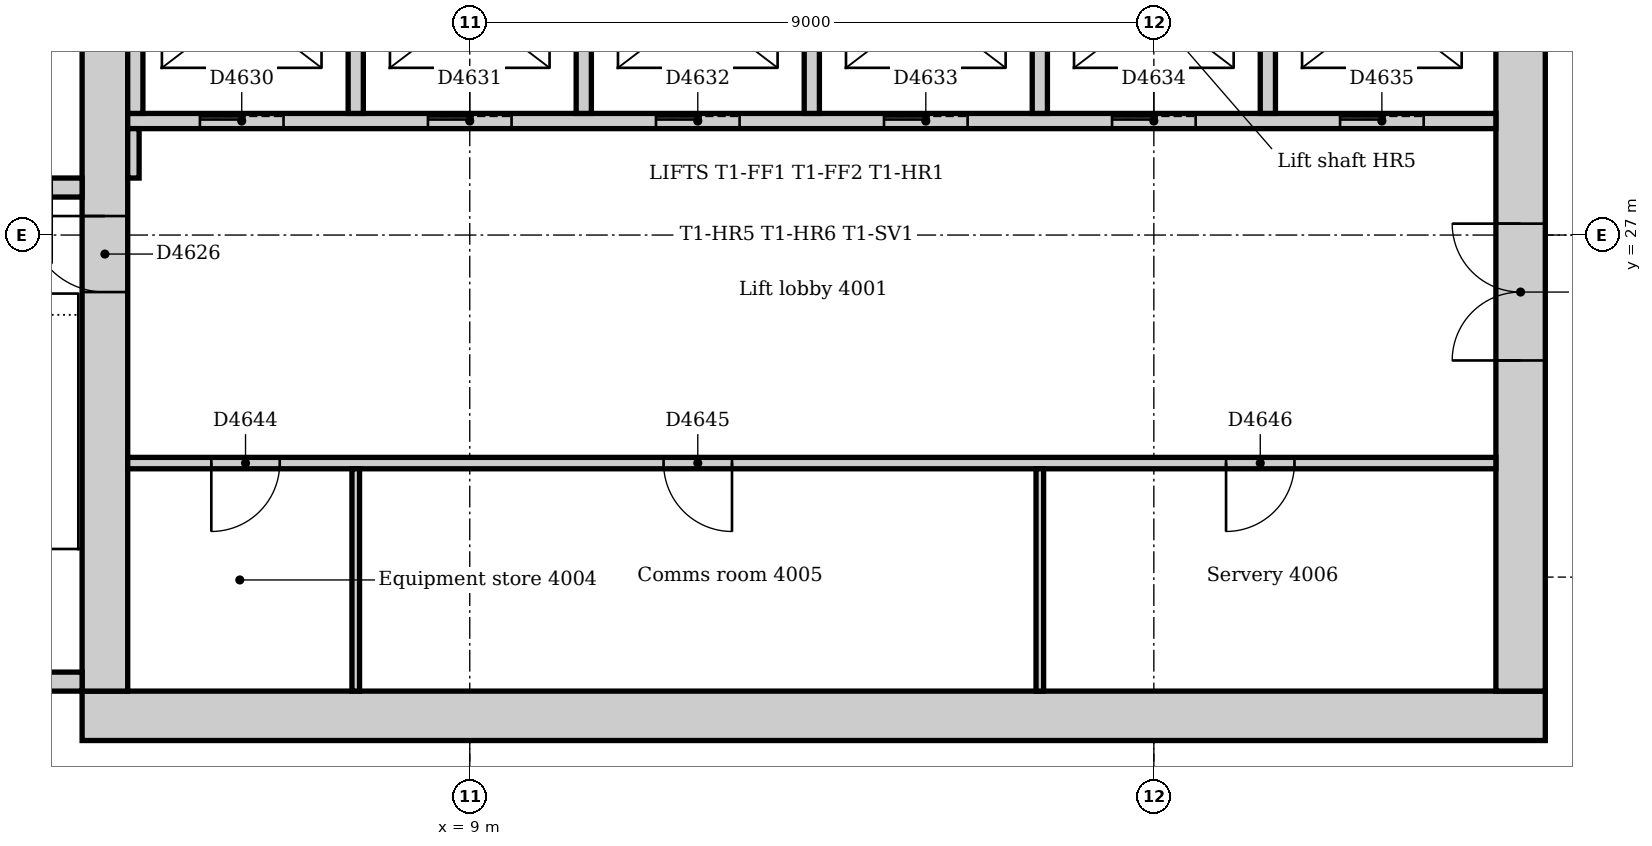
"""IFC4 building model, lengths in metres.
Left out: names, types, materials, properties, quantities, classifications, styles, units other than length and angle.
Written with IfcOpenShell. Run it as: python <this file> out.ifc"""

import sys

from ifc_helpers import new_model, si_unit, direction, frame, frame_2d, origin, place, context, subcontext, project, spatial, rectangle, extrude, element, fill, save


model = new_model("IFC4")
c1 = context("Model", 3, precision=1e-05, world=origin(), true_north=direction((0.0, 1.0)))
c2 = subcontext(c1, "Body", "Model", "MODEL_VIEW")
j1 = project(units=[si_unit("LENGTHUNIT", "METRE"), si_unit("PLANEANGLEUNIT", "RADIAN")], contexts=[c1])
p1 = place(None, origin())
s1 = spatial("IfcSite", under=j1, at=p1, CompositionType="ELEMENT")
p2 = place(p1, origin())
s2 = spatial("IfcBuilding", under=s1, at=p2, CompositionType="ELEMENT")
p3 = place(p2, frame((0.0, 0.0, 169.0)))
s3 = spatial("IfcBuildingStorey", under=s2, at=p3, CompositionType="ELEMENT", Elevation=169.0)
p4 = place(p3, frame((3.9, 20.675, 0.0), z_axis=(0.0, 0.0, 1.0), x_axis=(1.0, 0.0, 0.0)))
e1 = element("IfcWall", 1, at=p4, inside=s3, PredefinedType="SOLIDWALL", context=c2, shape_type="SweptSolid", body=[
    extrude(rectangle(XDim=19.25, YDim=0.65, at=frame_2d((9.625, 0.0))), origin(), (0.0, 0.0, 1.0), 4.0),
])
p5 = place(p3, frame((22.825, 21.0, 0.0), z_axis=(0.0, 0.0, 1.0), x_axis=(0.0, 1.0, 0.0)))
e2 = element("IfcWall", 2, at=p5, inside=s3, PredefinedType="SOLIDWALL", context=c2, shape_type="SweptSolid", body=[
    extrude(rectangle(XDim=10.5, YDim=0.65, at=frame_2d((5.25, 0.0))), origin(), (0.0, 0.0, 1.0), 4.0),
])
p6 = place(p5, frame((4.35, 0.0, 0.0)))
e3 = element("IfcOpeningElement", 3, at=p6, cuts=e2, PredefinedType="OPENING", context=c2, shape_type="SweptSolid", body=[
    extrude(rectangle(XDim=1.8, YDim=2.1, at=frame_2d((0.9, 1.05))), frame((0.0, 0.335, 0.0), z_axis=(0.0, -1.0, 0.0), x_axis=(1.0, 0.0, 0.0)), (0.0, 0.0, 1.0), 0.67),
])
p7 = place(p3, frame((4.2, 31.5, 0.0), z_axis=(0.0, 0.0, 1.0), x_axis=(0.0, -1.0, 0.0)))
e4 = element("IfcWall", 4, at=p7, inside=s3, PredefinedType="SOLIDWALL", context=c2, shape_type="SweptSolid", body=[
    extrude(rectangle(XDim=10.5, YDim=0.6, at=frame_2d((5.25, 0.0))), origin(), (0.0, 0.0, 1.0), 4.0),
])
p8 = place(p7, frame((4.25, 0.0, 0.0)))
e5 = element("IfcOpeningElement", 5, at=p8, cuts=e4, PredefinedType="OPENING", context=c2, shape_type="SweptSolid", body=[
    extrude(rectangle(XDim=1.0, YDim=2.1, at=frame_2d((0.5, 1.05))), frame((0.0, 0.31, 0.0), z_axis=(0.0, -1.0, 0.0), x_axis=(1.0, 0.0, 0.0)), (0.0, 0.0, 1.0), 0.62),
])
p9 = place(p3, frame((0.36, 21.125, 0.0), z_axis=(0.0, 0.0, 1.0), x_axis=(1.0, 0.0, 0.0)))
e6 = element("IfcWall", 6, at=p9, inside=s3, PredefinedType="SOLIDWALL", context=c2, shape_type="SweptSolid", body=[
    extrude(rectangle(XDim=3.54, YDim=0.25, at=frame_2d((1.77, 0.0))), origin(), (0.0, 0.0, 1.0), 4.0),
])
p10 = place(p3, frame((3.9, 27.625, 0.0), z_axis=(0.0, 0.0, 1.0), x_axis=(-1.0, 0.0, 0.0)))
e7 = element("IfcWall", 7, at=p10, inside=s3, PredefinedType="SOLIDWALL", context=c2, shape_type="SweptSolid", body=[
    extrude(rectangle(XDim=3.54, YDim=0.25, at=frame_2d((1.77, 0.0))), origin(), (0.0, 0.0, 1.0), 4.0),
])
p11 = place(p10, frame((0.4, 0.0, 0.0)))
e8 = element("IfcOpeningElement", 8, at=p11, cuts=e7, PredefinedType="OPENING", context=c2, shape_type="SweptSolid", body=[
    extrude(rectangle(XDim=1.0, YDim=2.1, at=frame_2d((0.5, 1.05))), frame((0.0, 0.135, 0.0), z_axis=(0.0, -1.0, 0.0), x_axis=(1.0, 0.0, 0.0)), (0.0, 0.0, 1.0), 0.27),
])
p12 = place(p3, frame((4.5, 28.5, 0.0), z_axis=(0.0, 0.0, 1.0), x_axis=(1.0, 0.0, 0.0)))
e9 = element("IfcWall", 9, at=p12, inside=s3, PredefinedType="PARTITIONING", context=c2, shape_type="SweptSolid", body=[
    extrude(rectangle(XDim=18.0, YDim=0.2, at=frame_2d((9.0, 0.0))), origin(), (0.0, 0.0, 1.0), 3.85),
])
p13 = place(p12, frame((0.95, 0.0, 0.0)))
e10 = element("IfcOpeningElement", 10, at=p13, cuts=e9, PredefinedType="OPENING", context=c2, shape_type="SweptSolid", body=[
    extrude(rectangle(XDim=1.1, YDim=2.1, at=frame_2d((0.55, 1.05))), frame((0.0, 0.11, 0.0), z_axis=(0.0, -1.0, 0.0), x_axis=(1.0, 0.0, 0.0)), (0.0, 0.0, 1.0), 0.22),
])
p14 = place(p12, frame((3.95, 0.0, 0.0)))
e11 = element("IfcOpeningElement", 11, at=p14, cuts=e9, PredefinedType="OPENING", context=c2, shape_type="SweptSolid", body=[
    extrude(rectangle(XDim=1.1, YDim=2.1, at=frame_2d((0.55, 1.05))), frame((0.0, 0.11, 0.0), z_axis=(0.0, -1.0, 0.0), x_axis=(1.0, 0.0, 0.0)), (0.0, 0.0, 1.0), 0.22),
])
p15 = place(p12, frame((6.95, 0.0, 0.0)))
e12 = element("IfcOpeningElement", 12, at=p15, cuts=e9, PredefinedType="OPENING", context=c2, shape_type="SweptSolid", body=[
    extrude(rectangle(XDim=1.1, YDim=2.1, at=frame_2d((0.55, 1.05))), frame((0.0, 0.11, 0.0), z_axis=(0.0, -1.0, 0.0), x_axis=(1.0, 0.0, 0.0)), (0.0, 0.0, 1.0), 0.22),
])
p16 = place(p12, frame((9.95, 0.0, 0.0)))
e13 = element("IfcOpeningElement", 13, at=p16, cuts=e9, PredefinedType="OPENING", context=c2, shape_type="SweptSolid", body=[
    extrude(rectangle(XDim=1.1, YDim=2.1, at=frame_2d((0.55, 1.05))), frame((0.0, 0.11, 0.0), z_axis=(0.0, -1.0, 0.0), x_axis=(1.0, 0.0, 0.0)), (0.0, 0.0, 1.0), 0.22),
])
p17 = place(p12, frame((12.95, 0.0, 0.0)))
e14 = element("IfcOpeningElement", 14, at=p17, cuts=e9, PredefinedType="OPENING", context=c2, shape_type="SweptSolid", body=[
    extrude(rectangle(XDim=1.1, YDim=2.1, at=frame_2d((0.55, 1.05))), frame((0.0, 0.11, 0.0), z_axis=(0.0, -1.0, 0.0), x_axis=(1.0, 0.0, 0.0)), (0.0, 0.0, 1.0), 0.22),
])
p18 = place(p12, frame((15.95, 0.0, 0.0)))
e15 = element("IfcOpeningElement", 15, at=p18, cuts=e9, PredefinedType="OPENING", context=c2, shape_type="SweptSolid", body=[
    extrude(rectangle(XDim=1.1, YDim=2.1, at=frame_2d((0.55, 1.05))), frame((0.0, 0.11, 0.0), z_axis=(0.0, -1.0, 0.0), x_axis=(1.0, 0.0, 0.0)), (0.0, 0.0, 1.0), 0.22),
])
for number, where, z_axis, x_axis in (
    (16, (10.5, 28.6, 0.0), (0.0, 0.0, 1.0), (0.0, 1.0, 0.0)),
    (17, (13.5, 28.6, 0.0), (0.0, 0.0, 1.0), (0.0, 1.0, 0.0)),
    (18, (16.5, 28.6, 0.0), (0.0, 0.0, 1.0), (0.0, 1.0, 0.0)),
    (19, (19.5, 28.6, 0.0), (0.0, 0.0, 1.0), (0.0, 1.0, 0.0)),
    (20, (4.6, 28.6, 0.0), (0.0, 0.0, 1.0), (0.0, 1.0, 0.0)),
    (21, (7.5, 28.6, 0.0), (0.0, 0.0, 1.0), (0.0, 1.0, 0.0)),
):
    element("IfcWall", number, at=place(p3, frame(where, z_axis=z_axis, x_axis=x_axis)), inside=s3, PredefinedType="PARTITIONING", context=c2, shape_type="SweptSolid", body=[
        extrude(rectangle(XDim=2.65, YDim=0.2, at=frame_2d((1.325, 0.0))), origin(), (0.0, 0.0, 1.0), 3.85),
    ])
p19 = place(p3, frame((4.5, 24.0, 0.0), z_axis=(0.0, 0.0, 1.0), x_axis=(1.0, 0.0, 0.0)))
e22 = element("IfcWall", 22, at=p19, inside=s3, PredefinedType="PARTITIONING", context=c2, shape_type="SweptSolid", body=[
    extrude(rectangle(XDim=18.0, YDim=0.15, at=frame_2d((9.0, 0.0))), origin(), (0.0, 0.0, 1.0), 3.85),
])
p20 = place(p19, frame((1.1, 0.0, 0.0)))
e23 = element("IfcOpeningElement", 23, at=p20, cuts=e22, PredefinedType="OPENING", context=c2, shape_type="SweptSolid", body=[
    extrude(rectangle(XDim=0.9, YDim=2.1, at=frame_2d((0.45, 1.05))), frame((0.0, 0.085, 0.0), z_axis=(0.0, -1.0, 0.0), x_axis=(1.0, 0.0, 0.0)), (0.0, 0.0, 1.0), 0.17),
])
p21 = place(p19, frame((7.05, 0.0, 0.0)))
e24 = element("IfcOpeningElement", 24, at=p21, cuts=e22, PredefinedType="OPENING", context=c2, shape_type="SweptSolid", body=[
    extrude(rectangle(XDim=0.9, YDim=2.1, at=frame_2d((0.45, 1.05))), frame((0.0, 0.085, 0.0), z_axis=(0.0, -1.0, 0.0), x_axis=(1.0, 0.0, 0.0)), (0.0, 0.0, 1.0), 0.17),
])
p22 = place(p19, frame((14.45, 0.0, 0.0)))
e25 = element("IfcOpeningElement", 25, at=p22, cuts=e22, PredefinedType="OPENING", context=c2, shape_type="SweptSolid", body=[
    extrude(rectangle(XDim=0.9, YDim=2.1, at=frame_2d((0.45, 1.05))), frame((0.0, 0.085, 0.0), z_axis=(0.0, -1.0, 0.0), x_axis=(1.0, 0.0, 0.0)), (0.0, 0.0, 1.0), 0.17),
])
p23 = place(p3, frame((4.575, 27.75, 0.0), z_axis=(0.0, 0.0, 1.0), x_axis=(0.0, 1.0, 0.0)))
e26 = element("IfcWall", 26, at=p23, inside=s3, PredefinedType="PARTITIONING", context=c2, shape_type="SweptSolid", body=[
    extrude(rectangle(XDim=0.65, YDim=0.15, at=frame_2d((0.325, 0.0))), origin(), (0.0, 0.0, 1.0), 3.85),
])
for number, where, z_axis, x_axis in (
    (27, (7.5, 21.0, 0.0), (0.0, 0.0, 1.0), (0.0, 1.0, 0.0)),
    (28, (16.5, 21.0, 0.0), (0.0, 0.0, 1.0), (0.0, 1.0, 0.0)),
):
    element("IfcWall", number, at=place(p3, frame(where, z_axis=z_axis, x_axis=x_axis)), inside=s3, PredefinedType="PARTITIONING", context=c2, shape_type="SweptSolid", body=[
        extrude(rectangle(XDim=2.925, YDim=0.1, at=frame_2d((1.462, 0.0))), origin(), (0.0, 0.0, 1.0), 3.85),
    ])
p24 = place(p8, frame((1.0, 0.0, 0.0), z_axis=(0.0, 0.0, 1.0), x_axis=(-1.0, 0.0, 0.0)))
e29 = element("IfcDoor", 29, at=p24, inside=s3, OperationType="SINGLE_SWING_RIGHT", PredefinedType="DOOR", context=c2, shape_type="SweptSolid", body=[
    extrude(rectangle(XDim=1.0, YDim=2.1, at=frame_2d((0.5, 1.05))), frame((0.0, 0.025, 0.0), z_axis=(0.0, -1.0, 0.0), x_axis=(1.0, 0.0, 0.0)), (0.0, 0.0, 1.0), 0.05),
])
fill(e5, e29)
p25 = place(p13, origin())
e30 = element("IfcDoor", 30, at=p25, inside=s3, OperationType="SLIDING_TO_LEFT", PredefinedType="DOOR", context=c2, shape_type="SweptSolid", body=[
    extrude(rectangle(XDim=1.1, YDim=2.1, at=frame_2d((0.55, 1.05))), frame((0.0, 0.025, 0.0), z_axis=(0.0, -1.0, 0.0), x_axis=(1.0, 0.0, 0.0)), (0.0, 0.0, 1.0), 0.05),
])
fill(e10, e30)
p26 = place(p14, origin())
e31 = element("IfcDoor", 31, at=p26, inside=s3, OperationType="SLIDING_TO_LEFT", PredefinedType="DOOR", context=c2, shape_type="SweptSolid", body=[
    extrude(rectangle(XDim=1.1, YDim=2.1, at=frame_2d((0.55, 1.05))), frame((0.0, 0.025, 0.0), z_axis=(0.0, -1.0, 0.0), x_axis=(1.0, 0.0, 0.0)), (0.0, 0.0, 1.0), 0.05),
])
fill(e11, e31)
p27 = place(p15, origin())
e32 = element("IfcDoor", 32, at=p27, inside=s3, OperationType="SLIDING_TO_LEFT", PredefinedType="DOOR", context=c2, shape_type="SweptSolid", body=[
    extrude(rectangle(XDim=1.1, YDim=2.1, at=frame_2d((0.55, 1.05))), frame((0.0, 0.025, 0.0), z_axis=(0.0, -1.0, 0.0), x_axis=(1.0, 0.0, 0.0)), (0.0, 0.0, 1.0), 0.05),
])
fill(e12, e32)
p28 = place(p16, origin())
e33 = element("IfcDoor", 33, at=p28, inside=s3, OperationType="SLIDING_TO_LEFT", PredefinedType="DOOR", context=c2, shape_type="SweptSolid", body=[
    extrude(rectangle(XDim=1.1, YDim=2.1, at=frame_2d((0.55, 1.05))), frame((0.0, 0.025, 0.0), z_axis=(0.0, -1.0, 0.0), x_axis=(1.0, 0.0, 0.0)), (0.0, 0.0, 1.0), 0.05),
])
fill(e13, e33)
p29 = place(p17, origin())
e34 = element("IfcDoor", 34, at=p29, inside=s3, OperationType="SLIDING_TO_LEFT", PredefinedType="DOOR", context=c2, shape_type="SweptSolid", body=[
    extrude(rectangle(XDim=1.1, YDim=2.1, at=frame_2d((0.55, 1.05))), frame((0.0, 0.025, 0.0), z_axis=(0.0, -1.0, 0.0), x_axis=(1.0, 0.0, 0.0)), (0.0, 0.0, 1.0), 0.05),
])
fill(e14, e34)
p30 = place(p18, origin())
e35 = element("IfcDoor", 35, at=p30, inside=s3, OperationType="SLIDING_TO_LEFT", PredefinedType="DOOR", context=c2, shape_type="SweptSolid", body=[
    extrude(rectangle(XDim=1.1, YDim=2.1, at=frame_2d((0.55, 1.05))), frame((0.0, 0.025, 0.0), z_axis=(0.0, -1.0, 0.0), x_axis=(1.0, 0.0, 0.0)), (0.0, 0.0, 1.0), 0.05),
])
fill(e15, e35)
p31 = place(p6, origin())
e36 = element("IfcDoor", 36, at=p31, inside=s3, OperationType="DOUBLE_DOOR_DOUBLE_SWING", PredefinedType="DOOR", context=c2, shape_type="SweptSolid", body=[
    extrude(rectangle(XDim=1.8, YDim=2.1, at=frame_2d((0.9, 1.05))), frame((0.0, 0.025, 0.0), z_axis=(0.0, -1.0, 0.0), x_axis=(1.0, 0.0, 0.0)), (0.0, 0.0, 1.0), 0.05),
])
fill(e3, e36)
p32 = place(p20, frame((0.9, 0.0, 0.0), z_axis=(0.0, 0.0, 1.0), x_axis=(-1.0, 0.0, 0.0)))
e37 = element("IfcDoor", 37, at=p32, inside=s3, OperationType="SINGLE_SWING_RIGHT", PredefinedType="DOOR", context=c2, shape_type="SweptSolid", body=[
    extrude(rectangle(XDim=0.9, YDim=2.1, at=frame_2d((0.45, 1.05))), frame((0.0, 0.025, 0.0), z_axis=(0.0, -1.0, 0.0), x_axis=(1.0, 0.0, 0.0)), (0.0, 0.0, 1.0), 0.05),
])
fill(e23, e37)
p33 = place(p21, frame((0.9, 0.0, 0.0), z_axis=(0.0, 0.0, 1.0), x_axis=(-1.0, 0.0, 0.0)))
e38 = element("IfcDoor", 38, at=p33, inside=s3, OperationType="SINGLE_SWING_LEFT", PredefinedType="DOOR", context=c2, shape_type="SweptSolid", body=[
    extrude(rectangle(XDim=0.9, YDim=2.1, at=frame_2d((0.45, 1.05))), frame((0.0, 0.025, 0.0), z_axis=(0.0, -1.0, 0.0), x_axis=(1.0, 0.0, 0.0)), (0.0, 0.0, 1.0), 0.05),
])
fill(e24, e38)
p34 = place(p22, frame((0.9, 0.0, 0.0), z_axis=(0.0, 0.0, 1.0), x_axis=(-1.0, 0.0, 0.0)))
e39 = element("IfcDoor", 39, at=p34, inside=s3, OperationType="SINGLE_SWING_RIGHT", PredefinedType="DOOR", context=c2, shape_type="SweptSolid", body=[
    extrude(rectangle(XDim=0.9, YDim=2.1, at=frame_2d((0.45, 1.05))), frame((0.0, 0.025, 0.0), z_axis=(0.0, -1.0, 0.0), x_axis=(1.0, 0.0, 0.0)), (0.0, 0.0, 1.0), 0.05),
])
fill(e25, e39)
save(model, sys.argv[1])
